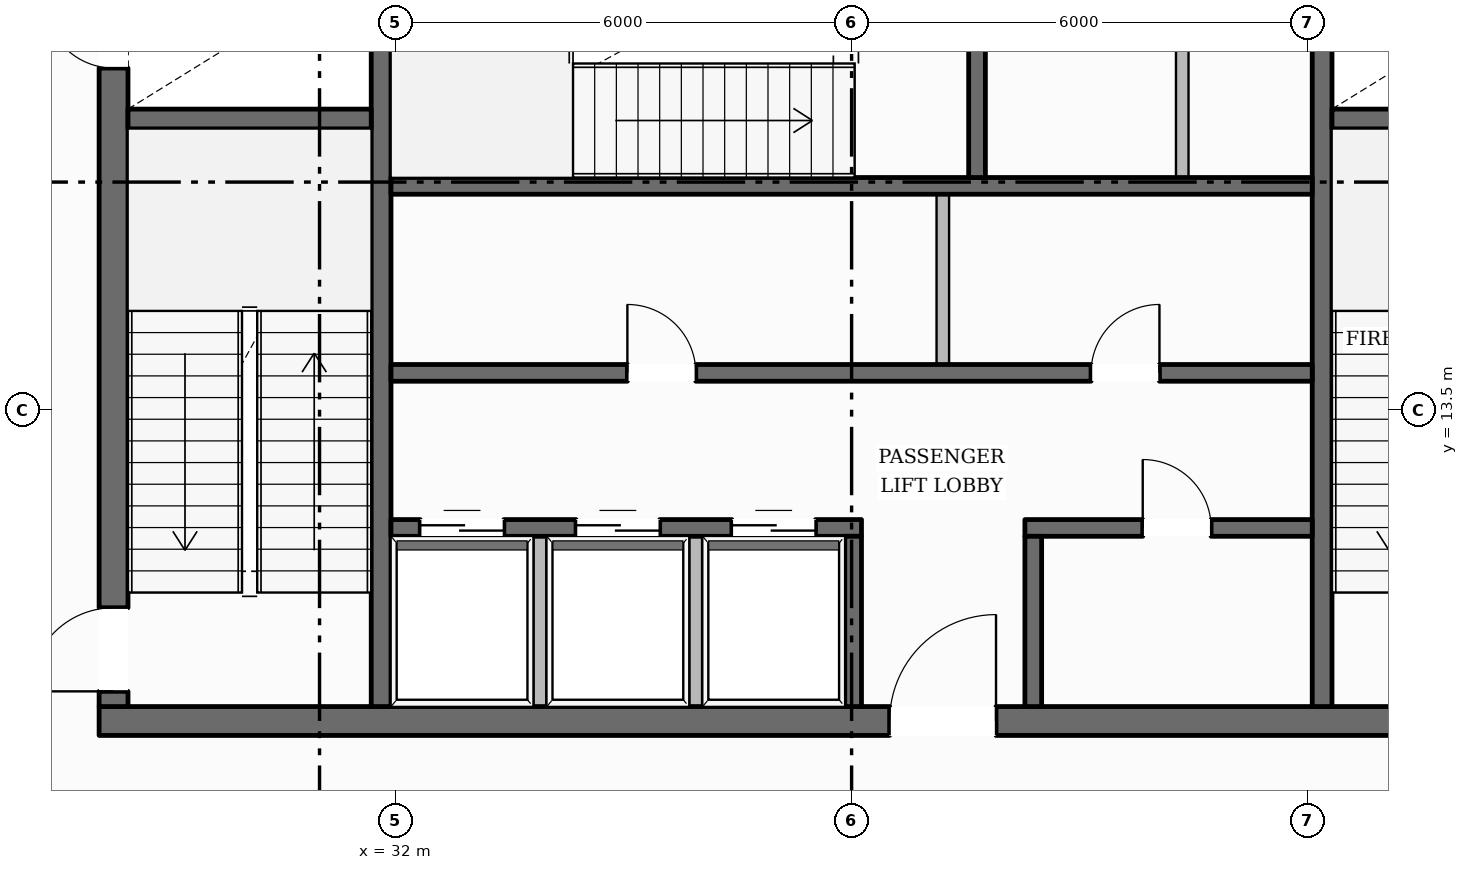
"""IFC4 building model, lengths in metres.
Left out: names, types, materials, properties, quantities, classifications, styles, units other than length and angle.
Written with IfcOpenShell. Run it as: python <this file> out.ifc"""

import sys

from ifc_helpers import new_model, si_unit, direction, frame, frame_2d, origin, place, context, subcontext, project, spatial, rectangle, extrude, element, fill, save


model = new_model("IFC4")
c1 = context("Model", 3, precision=1e-05, world=origin(), true_north=direction((0.0, 1.0)))
c2 = subcontext(c1, "Body", "Model", "MODEL_VIEW")
j1 = project(units=[si_unit("LENGTHUNIT", "METRE"), si_unit("PLANEANGLEUNIT", "RADIAN")], contexts=[c1])
p1 = place(None, origin())
s1 = spatial("IfcSite", under=j1, at=p1, CompositionType="ELEMENT")
p2 = place(p1, origin())
s2 = spatial("IfcBuilding", under=s1, at=p2, CompositionType="ELEMENT")
p3 = place(p2, frame((0.0, 0.0, 304.95)))
s3 = spatial("IfcBuildingStorey", under=s2, at=p3, CompositionType="ELEMENT", Elevation=304.95)
p4 = place(p3, frame((28.1, 9.41, 0.0), z_axis=(0.0, 0.0, 1.0), x_axis=(1.0, 0.0, 0.0)))
e1 = element("IfcWall", 1, at=p4, inside=s3, PredefinedType="SOLIDWALL", context=c2, shape_type="SweptSolid", body=[
    extrude(rectangle(XDim=19.8, YDim=0.38, at=frame_2d((9.9, 0.0))), origin(), (0.0, 0.0, 1.0), 4.77),
])
p5 = place(p4, frame((10.4, 0.0, 0.0)))
e2 = element("IfcOpeningElement", 2, at=p5, cuts=e1, PredefinedType="OPENING", context=c2, shape_type="SweptSolid", body=[
    extrude(rectangle(XDim=1.4, YDim=2.2, at=frame_2d((0.7, 1.1))), frame((0.0, 0.2, 0.0), z_axis=(0.0, -1.0, 0.0), x_axis=(1.0, 0.0, 0.0)), (0.0, 0.0, 1.0), 0.4),
])
p6 = place(p3, frame((28.29, 9.6, 0.0), z_axis=(0.0, 0.0, 1.0), x_axis=(0.0, 1.0, 0.0)))
e3 = element("IfcWall", 3, at=p6, inside=s3, PredefinedType="SOLIDWALL", context=c2, shape_type="SweptSolid", body=[
    extrude(rectangle(XDim=13.0, YDim=0.38, at=frame_2d((6.5, 0.0))), origin(), (0.0, 0.0, 1.0), 4.77),
])
p7 = place(p6, frame((0.2, 0.0, 0.0)))
e4 = element("IfcOpeningElement", 4, at=p7, cuts=e3, PredefinedType="OPENING", context=c2, shape_type="SweptSolid", body=[
    extrude(rectangle(XDim=1.1, YDim=2.15, at=frame_2d((0.55, 1.075))), frame((0.0, 0.2, 0.0), z_axis=(0.0, -1.0, 0.0), x_axis=(1.0, 0.0, 0.0)), (0.0, 0.0, 1.0), 0.4),
])
p8 = place(p6, frame((8.4, 0.0, 0.0)))
e5 = element("IfcOpeningElement", 5, at=p8, cuts=e3, PredefinedType="OPENING", context=c2, shape_type="SweptSolid", body=[
    extrude(rectangle(XDim=0.9, YDim=2.1, at=frame_2d((0.45, 1.05))), frame((0.0, 0.2, 0.0), z_axis=(0.0, -1.0, 0.0), x_axis=(1.0, 0.0, 0.0)), (0.0, 0.0, 1.0), 0.4),
])
p9 = place(p3, frame((31.81, 9.6, 0.0), z_axis=(0.0, 0.0, 1.0), x_axis=(0.0, 1.0, 0.0)))
e6 = element("IfcWall", 6, at=p9, inside=s3, PredefinedType="SHEAR", context=c2, shape_type="SweptSolid", body=[
    extrude(rectangle(XDim=13.0, YDim=0.26, at=frame_2d((6.5, 0.0))), origin(), (0.0, 0.0, 1.0), 4.77),
])
p10 = place(p9, frame((10.925, 0.0, 0.0)))
e7 = element("IfcOpeningElement", 7, at=p10, cuts=e6, PredefinedType="OPENING", context=c2, shape_type="SweptSolid", body=[
    extrude(rectangle(XDim=1.25, YDim=2.25, at=frame_2d((0.625, 1.125))), frame((0.0, 0.14, 0.0), z_axis=(0.0, -1.0, 0.0), x_axis=(1.0, 0.0, 0.0)), (0.0, 0.0, 1.0), 0.28),
])
p11 = place(p3, frame((44.19, 9.6, 0.0), z_axis=(0.0, 0.0, 1.0), x_axis=(0.0, 1.0, 0.0)))
e8 = element("IfcWall", 8, at=p11, inside=s3, PredefinedType="SHEAR", context=c2, shape_type="SweptSolid", body=[
    extrude(rectangle(XDim=13.0, YDim=0.26, at=frame_2d((6.5, 0.0))), origin(), (0.0, 0.0, 1.0), 4.77),
])
p12 = place(p11, frame((10.925, 0.0, 0.0)))
e9 = element("IfcOpeningElement", 9, at=p12, cuts=e8, PredefinedType="OPENING", context=c2, shape_type="SweptSolid", body=[
    extrude(rectangle(XDim=1.25, YDim=2.25, at=frame_2d((0.625, 1.125))), frame((0.0, 0.14, 0.0), z_axis=(0.0, -1.0, 0.0), x_axis=(1.0, 0.0, 0.0)), (0.0, 0.0, 1.0), 0.28),
])
for number, where, z_axis, x_axis in (
    (10, (28.48, 17.33, 0.0), (0.0, 0.0, 1.0), (1.0, 0.0, 0.0)),
    (11, (44.32, 17.33, 0.0), (0.0, 0.0, 1.0), (1.0, 0.0, 0.0)),
):
    element("IfcWall", number, at=place(p3, frame(where, z_axis=z_axis, x_axis=x_axis)), inside=s3, PredefinedType="SHEAR", context=c2, shape_type="SweptSolid", body=[
        extrude(rectangle(XDim=3.2, YDim=0.26, at=frame_2d((1.6, 0.0))), origin(), (0.0, 0.0, 1.0), 4.77),
    ])
p13 = place(p3, frame((31.94, 16.45, 0.0), z_axis=(0.0, 0.0, 1.0), x_axis=(1.0, 0.0, 0.0)))
e12 = element("IfcWall", 12, at=p13, inside=s3, PredefinedType="SOLIDWALL", context=c2, shape_type="SweptSolid", body=[
    extrude(rectangle(XDim=12.12, YDim=0.22, at=frame_2d((6.06, 0.0))), origin(), (0.0, 0.0, 1.0), 4.77),
])
p14 = place(p3, frame((39.65, 16.56, 0.0), z_axis=(0.0, 0.0, 1.0), x_axis=(0.0, 1.0, 0.0)))
e13 = element("IfcWall", 13, at=p14, inside=s3, PredefinedType="SOLIDWALL", context=c2, shape_type="SweptSolid", body=[
    extrude(rectangle(XDim=3.2, YDim=0.22, at=frame_2d((1.6, 0.0))), origin(), (0.0, 0.0, 1.0), 4.77),
])
p15 = place(p3, frame((31.94, 13.99, 0.0), z_axis=(0.0, 0.0, 1.0), x_axis=(1.0, 0.0, 0.0)))
e14 = element("IfcWall", 14, at=p15, inside=s3, PredefinedType="SOLIDWALL", context=c2, shape_type="SweptSolid", body=[
    extrude(rectangle(XDim=12.12, YDim=0.22, at=frame_2d((6.06, 0.0))), origin(), (0.0, 0.0, 1.0), 4.77),
])
p16 = place(p15, frame((3.11, 0.0, 0.0)))
e15 = element("IfcOpeningElement", 15, at=p16, cuts=e14, PredefinedType="OPENING", context=c2, shape_type="SweptSolid", body=[
    extrude(rectangle(XDim=0.9, YDim=2.1, at=frame_2d((0.45, 1.05))), frame((0.0, 0.12, 0.0), z_axis=(0.0, -1.0, 0.0), x_axis=(1.0, 0.0, 0.0)), (0.0, 0.0, 1.0), 0.24),
])
p17 = place(p15, frame((9.21, 0.0, 0.0)))
e16 = element("IfcOpeningElement", 16, at=p17, cuts=e14, PredefinedType="OPENING", context=c2, shape_type="SweptSolid", body=[
    extrude(rectangle(XDim=0.9, YDim=2.1, at=frame_2d((0.45, 1.05))), frame((0.0, 0.12, 0.0), z_axis=(0.0, -1.0, 0.0), x_axis=(1.0, 0.0, 0.0)), (0.0, 0.0, 1.0), 0.24),
])
p18 = place(p3, frame((31.94, 11.95, 0.0), z_axis=(0.0, 0.0, 1.0), x_axis=(1.0, 0.0, 0.0)))
e17 = element("IfcWall", 17, at=p18, inside=s3, PredefinedType="SOLIDWALL", context=c2, shape_type="SweptSolid", body=[
    extrude(rectangle(XDim=6.19, YDim=0.22, at=frame_2d((3.095, 0.0))), origin(), (0.0, 0.0, 1.0), 4.77),
])
p19 = place(p18, frame((0.385, 0.0, 0.0)))
e18 = element("IfcOpeningElement", 18, at=p19, cuts=e17, PredefinedType="OPENING", context=c2, shape_type="SweptSolid", body=[
    extrude(rectangle(XDim=1.1, YDim=2.2, at=frame_2d((0.55, 1.1))), frame((0.0, 0.12, 0.0), z_axis=(0.0, -1.0, 0.0), x_axis=(1.0, 0.0, 0.0)), (0.0, 0.0, 1.0), 0.24),
])
p20 = place(p18, frame((2.435, 0.0, 0.0)))
e19 = element("IfcOpeningElement", 19, at=p20, cuts=e17, PredefinedType="OPENING", context=c2, shape_type="SweptSolid", body=[
    extrude(rectangle(XDim=1.1, YDim=2.2, at=frame_2d((0.55, 1.1))), frame((0.0, 0.12, 0.0), z_axis=(0.0, -1.0, 0.0), x_axis=(1.0, 0.0, 0.0)), (0.0, 0.0, 1.0), 0.24),
])
p21 = place(p18, frame((4.485, 0.0, 0.0)))
e20 = element("IfcOpeningElement", 20, at=p21, cuts=e17, PredefinedType="OPENING", context=c2, shape_type="SweptSolid", body=[
    extrude(rectangle(XDim=1.1, YDim=2.2, at=frame_2d((0.55, 1.1))), frame((0.0, 0.12, 0.0), z_axis=(0.0, -1.0, 0.0), x_axis=(1.0, 0.0, 0.0)), (0.0, 0.0, 1.0), 0.24),
])
p22 = place(p3, frame((40.28, 11.95, 0.0), z_axis=(0.0, 0.0, 1.0), x_axis=(1.0, 0.0, 0.0)))
e21 = element("IfcWall", 21, at=p22, inside=s3, PredefinedType="SOLIDWALL", context=c2, shape_type="SweptSolid", body=[
    extrude(rectangle(XDim=3.78, YDim=0.22, at=frame_2d((1.89, 0.0))), origin(), (0.0, 0.0, 1.0), 4.77),
])
p23 = place(p22, frame((1.55, 0.0, 0.0)))
e22 = element("IfcOpeningElement", 22, at=p23, cuts=e21, PredefinedType="OPENING", context=c2, shape_type="SweptSolid", body=[
    extrude(rectangle(XDim=0.9, YDim=2.1, at=frame_2d((0.45, 1.05))), frame((0.0, 0.12, 0.0), z_axis=(0.0, -1.0, 0.0), x_axis=(1.0, 0.0, 0.0)), (0.0, 0.0, 1.0), 0.24),
])
for number, where, z_axis, x_axis in (
    (23, (38.02, 9.6, 0.0), (0.0, 0.0, 1.0), (0.0, 1.0, 0.0)),
    (24, (40.39, 9.6, 0.0), (0.0, 0.0, 1.0), (0.0, 1.0, 0.0)),
):
    element("IfcWall", number, at=place(p3, frame(where, z_axis=z_axis, x_axis=x_axis)), inside=s3, PredefinedType="SOLIDWALL", context=c2, shape_type="SweptSolid", body=[
        extrude(rectangle(XDim=2.24, YDim=0.22, at=frame_2d((1.12, 0.0))), origin(), (0.0, 0.0, 1.0), 4.77),
    ])
p24 = place(p3, frame((15.972, 10.23, 0.0), z_axis=(0.0, 0.0, 1.0), x_axis=(0.490734788737, 0.871308996352, 0.0)))
e25 = element("IfcWall", 25, at=p24, inside=s3, PredefinedType="STANDARD", context=c2, shape_type="SweptSolid", body=[
    extrude(rectangle(XDim=39.892, YDim=0.35, at=frame_2d((19.946, 0.0))), origin(), (0.0, 0.0, 1.0), 4.012),
])
p25 = place(p24, frame((35.116, 0.0, 0.65)))
e26 = element("IfcOpeningElement", 26, at=p25, cuts=e25, PredefinedType="OPENING", context=c2, shape_type="SweptSolid", body=[
    extrude(rectangle(XDim=2.1, YDim=2.3, at=frame_2d((1.05, 1.15))), frame((0.0, 0.185, 0.0), z_axis=(0.0, -1.0, 0.0), x_axis=(1.0, 0.0, 0.0)), (0.0, 0.0, 1.0), 0.37),
])
p26 = place(p24, frame((2.666, 0.0, 0.65)))
e27 = element("IfcOpeningElement", 27, at=p26, cuts=e25, PredefinedType="OPENING", context=c2, shape_type="SweptSolid", body=[
    extrude(rectangle(XDim=2.1, YDim=2.3, at=frame_2d((1.05, 1.15))), frame((0.0, 0.185, 0.0), z_axis=(0.0, -1.0, 0.0), x_axis=(1.0, 0.0, 0.0)), (0.0, 0.0, 1.0), 0.37),
])
p27 = place(p3, frame((40.452, 44.989, 0.0), z_axis=(0.0, 0.0, 1.0), x_axis=(0.490734788737, -0.871308996352, 0.0)))
e28 = element("IfcWall", 28, at=p27, inside=s3, PredefinedType="STANDARD", context=c2, shape_type="SweptSolid", body=[
    extrude(rectangle(XDim=39.892, YDim=0.35, at=frame_2d((19.946, 0.0))), origin(), (0.0, 0.0, 1.0), 4.012),
])
p28 = place(p27, frame((35.126, 0.0, 0.65)))
e29 = element("IfcOpeningElement", 29, at=p28, cuts=e28, PredefinedType="OPENING", context=c2, shape_type="SweptSolid", body=[
    extrude(rectangle(XDim=2.1, YDim=2.3, at=frame_2d((1.05, 1.15))), frame((0.0, 0.185, 0.0), z_axis=(0.0, -1.0, 0.0), x_axis=(1.0, 0.0, 0.0)), (0.0, 0.0, 1.0), 0.37),
])
p29 = place(p27, frame((2.676, 0.0, 0.65)))
e30 = element("IfcOpeningElement", 30, at=p29, cuts=e28, PredefinedType="OPENING", context=c2, shape_type="SweptSolid", body=[
    extrude(rectangle(XDim=2.1, YDim=2.3, at=frame_2d((1.05, 1.15))), frame((0.0, 0.185, 0.0), z_axis=(0.0, -1.0, 0.0), x_axis=(1.0, 0.0, 0.0)), (0.0, 0.0, 1.0), 0.37),
])
for number, where, z_axis, x_axis in (
    (31, (33.9, 9.49, 0.0), (0.0, 0.0, 1.0), (0.0, 1.0, 0.0)),
    (32, (35.95, 9.49, 0.0), (0.0, 0.0, 1.0), (0.0, 1.0, 0.0)),
):
    element("IfcWall", number, at=place(p3, frame(where, z_axis=z_axis, x_axis=x_axis)), inside=s3, PredefinedType="PARTITIONING", context=c2, shape_type="SweptSolid", body=[
        extrude(rectangle(XDim=2.35, YDim=0.165, at=frame_2d((1.175, 0.0))), origin(), (0.0, 0.0, 1.0), 4.77),
    ])
p30 = place(p3, frame((39.2, 14.1, 0.0), z_axis=(0.0, 0.0, 1.0), x_axis=(0.0, 1.0, 0.0)))
e33 = element("IfcWall", 33, at=p30, inside=s3, PredefinedType="PARTITIONING", context=c2, shape_type="SweptSolid", body=[
    extrude(rectangle(XDim=2.24, YDim=0.165, at=frame_2d((1.12, 0.0))), origin(), (0.0, 0.0, 1.0), 4.77),
])
p31 = place(p3, frame((42.35, 16.56, 0.0), z_axis=(0.0, 0.0, 1.0), x_axis=(0.0, 1.0, 0.0)))
e34 = element("IfcWall", 34, at=p31, inside=s3, PredefinedType="PARTITIONING", context=c2, shape_type="SweptSolid", body=[
    extrude(rectangle(XDim=3.2, YDim=0.165, at=frame_2d((1.6, 0.0))), origin(), (0.0, 0.0, 1.0), 4.77),
])
p32 = place(p7, origin())
e35 = element("IfcDoor", 35, at=p32, inside=s3, OperationType="SINGLE_SWING_LEFT", PredefinedType="DOOR", context=c2, shape_type="SweptSolid", body=[
    extrude(rectangle(XDim=1.1, YDim=2.15, at=frame_2d((0.55, 1.075))), frame((0.0, 0.025, 0.0), z_axis=(0.0, -1.0, 0.0), x_axis=(1.0, 0.0, 0.0)), (0.0, 0.0, 1.0), 0.05),
])
fill(e4, e35)
p33 = place(p8, origin())
e36 = element("IfcDoor", 36, at=p33, inside=s3, OperationType="SINGLE_SWING_RIGHT", PredefinedType="DOOR", context=c2, shape_type="SweptSolid", body=[
    extrude(rectangle(XDim=0.9, YDim=2.1, at=frame_2d((0.45, 1.05))), frame((0.0, 0.025, 0.0), z_axis=(0.0, -1.0, 0.0), x_axis=(1.0, 0.0, 0.0)), (0.0, 0.0, 1.0), 0.05),
])
fill(e5, e36)
p34 = place(p5, origin())
e37 = element("IfcDoor", 37, at=p34, inside=s3, OperationType="SINGLE_SWING_RIGHT", PredefinedType="DOOR", context=c2, shape_type="SweptSolid", body=[
    extrude(rectangle(XDim=1.4, YDim=2.2, at=frame_2d((0.7, 1.1))), frame((0.0, 0.025, 0.0), z_axis=(0.0, -1.0, 0.0), x_axis=(1.0, 0.0, 0.0)), (0.0, 0.0, 1.0), 0.05),
])
fill(e2, e37)
p35 = place(p19, origin())
e38 = element("IfcDoor", 38, at=p35, inside=s3, OperationType="DOUBLE_DOOR_SLIDING", PredefinedType="DOOR", context=c2, shape_type="SweptSolid", body=[
    extrude(rectangle(XDim=1.1, YDim=2.2, at=frame_2d((0.55, 1.1))), frame((0.0, 0.025, 0.0), z_axis=(0.0, -1.0, 0.0), x_axis=(1.0, 0.0, 0.0)), (0.0, 0.0, 1.0), 0.05),
])
fill(e18, e38)
p36 = place(p20, origin())
e39 = element("IfcDoor", 39, at=p36, inside=s3, OperationType="DOUBLE_DOOR_SLIDING", PredefinedType="DOOR", context=c2, shape_type="SweptSolid", body=[
    extrude(rectangle(XDim=1.1, YDim=2.2, at=frame_2d((0.55, 1.1))), frame((0.0, 0.025, 0.0), z_axis=(0.0, -1.0, 0.0), x_axis=(1.0, 0.0, 0.0)), (0.0, 0.0, 1.0), 0.05),
])
fill(e19, e39)
p37 = place(p21, origin())
e40 = element("IfcDoor", 40, at=p37, inside=s3, OperationType="DOUBLE_DOOR_SLIDING", PredefinedType="DOOR", context=c2, shape_type="SweptSolid", body=[
    extrude(rectangle(XDim=1.1, YDim=2.2, at=frame_2d((0.55, 1.1))), frame((0.0, 0.025, 0.0), z_axis=(0.0, -1.0, 0.0), x_axis=(1.0, 0.0, 0.0)), (0.0, 0.0, 1.0), 0.05),
])
fill(e20, e40)
p38 = place(p16, origin())
e41 = element("IfcDoor", 41, at=p38, inside=s3, OperationType="SINGLE_SWING_LEFT", PredefinedType="DOOR", context=c2, shape_type="SweptSolid", body=[
    extrude(rectangle(XDim=0.9, YDim=2.1, at=frame_2d((0.45, 1.05))), frame((0.0, 0.025, 0.0), z_axis=(0.0, -1.0, 0.0), x_axis=(1.0, 0.0, 0.0)), (0.0, 0.0, 1.0), 0.05),
])
fill(e15, e41)
p39 = place(p17, origin())
e42 = element("IfcDoor", 42, at=p39, inside=s3, OperationType="SINGLE_SWING_RIGHT", PredefinedType="DOOR", context=c2, shape_type="SweptSolid", body=[
    extrude(rectangle(XDim=0.9, YDim=2.1, at=frame_2d((0.45, 1.05))), frame((0.0, 0.025, 0.0), z_axis=(0.0, -1.0, 0.0), x_axis=(1.0, 0.0, 0.0)), (0.0, 0.0, 1.0), 0.05),
])
fill(e16, e42)
p40 = place(p23, origin())
e43 = element("IfcDoor", 43, at=p40, inside=s3, OperationType="SINGLE_SWING_LEFT", PredefinedType="DOOR", context=c2, shape_type="SweptSolid", body=[
    extrude(rectangle(XDim=0.9, YDim=2.1, at=frame_2d((0.45, 1.05))), frame((0.0, 0.025, 0.0), z_axis=(0.0, -1.0, 0.0), x_axis=(1.0, 0.0, 0.0)), (0.0, 0.0, 1.0), 0.05),
])
fill(e22, e43)
save(model, sys.argv[1])
